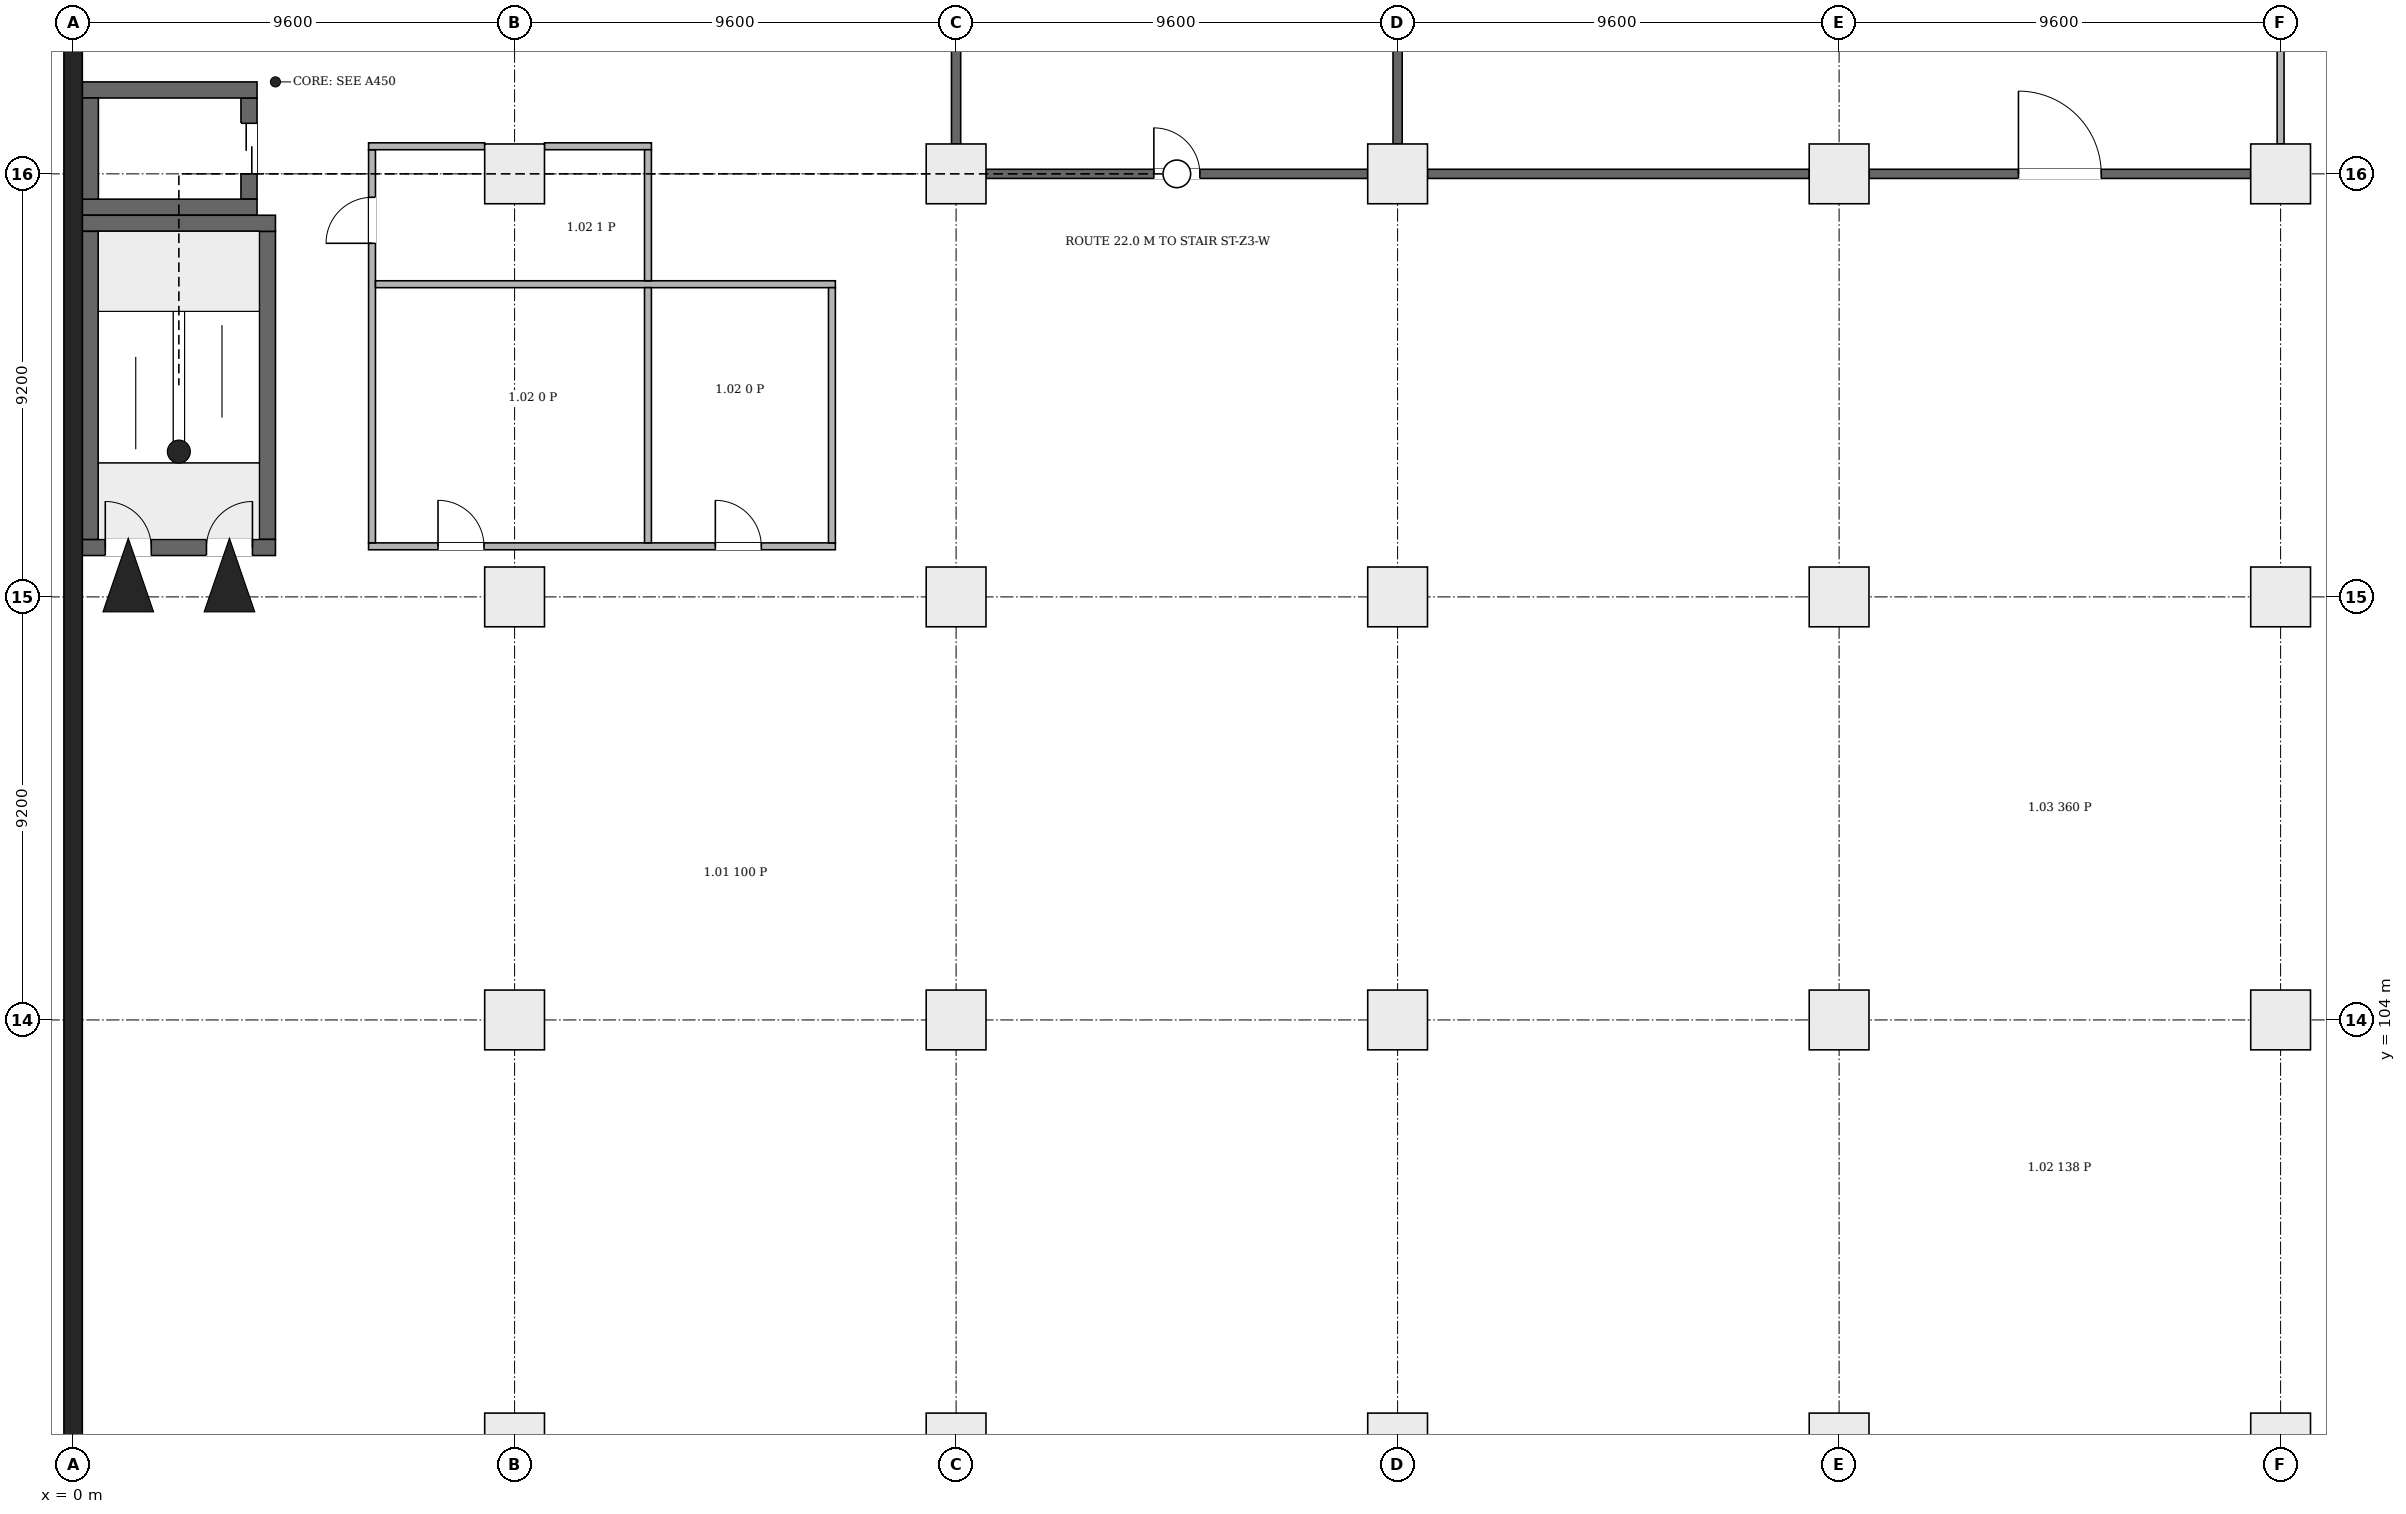
"""IFC4 building model, lengths in metres.
Left out: names, types, materials, properties, quantities, classifications, styles, units other than length and angle.
Written with IfcOpenShell. Run it as: python <this file> out.ifc"""

import sys

from ifc_helpers import new_model, si_unit, direction, frame, frame_2d, origin, origin_2d, place, context, subcontext, project, spatial, rectangle, extrude, element, fill, save


model = new_model("IFC4")
c1 = context("Model", 3, precision=1e-05, world=origin(), true_north=direction((0.0, 1.0)))
c2 = subcontext(c1, "Body", "Model", "MODEL_VIEW")
j1 = project(units=[si_unit("LENGTHUNIT", "METRE"), si_unit("PLANEANGLEUNIT", "RADIAN")], contexts=[c1])
p1 = place(None, origin())
s1 = spatial("IfcSite", under=j1, at=p1, CompositionType="ELEMENT")
p2 = place(p1, origin())
s2 = spatial("IfcBuilding", under=s1, at=p2, CompositionType="ELEMENT")
p3 = place(p2, frame((0.0, 0.0, 6.5)))
s3 = spatial("IfcBuildingStorey", under=s2, at=p3, CompositionType="ELEMENT", Elevation=6.5)
p4 = place(p3, frame((0.0, 94.12, 0.0), z_axis=(0.0, 0.0, 1.0), x_axis=(0.0, 1.0, 0.0)))
e1 = element("IfcWall", 1, at=p4, inside=s3, PredefinedType="SHEAR", context=c2, shape_type="SweptSolid", body=[
    extrude(rectangle(XDim=46.88, YDim=0.4, at=frame_2d((23.44, 0.0))), origin(), (0.0, 0.0, 1.0), 7.7),
])
p5 = place(p3, frame((0.2, 114.275, 0.0), z_axis=(0.0, 0.0, 1.0), x_axis=(1.0, 0.0, 0.0)))
e2 = element("IfcWall", 2, at=p5, inside=s3, PredefinedType="SHEAR", context=c2, shape_type="SweptSolid", body=[
    extrude(rectangle(XDim=4.2, YDim=0.35, at=frame_2d((2.1, 0.0))), origin(), (0.0, 0.0, 1.0), 7.7),
])
p6 = place(p5, frame((0.5, 0.0, 0.0)))
e3 = element("IfcOpeningElement", 3, at=p6, cuts=e2, PredefinedType="OPENING", context=c2, shape_type="SweptSolid", body=[
    extrude(rectangle(XDim=1.0, YDim=2.1, at=frame_2d((0.5, 1.05))), frame((0.0, 0.185, 0.0), z_axis=(0.0, -1.0, 0.0), x_axis=(1.0, 0.0, 0.0)), (0.0, 0.0, 1.0), 0.37),
])
p7 = place(p5, frame((2.7, 0.0, 0.0)))
e4 = element("IfcOpeningElement", 4, at=p7, cuts=e2, PredefinedType="OPENING", context=c2, shape_type="SweptSolid", body=[
    extrude(rectangle(XDim=1.0, YDim=2.1, at=frame_2d((0.5, 1.05))), frame((0.0, 0.185, 0.0), z_axis=(0.0, -1.0, 0.0), x_axis=(1.0, 0.0, 0.0)), (0.0, 0.0, 1.0), 0.37),
])
p8 = place(p3, frame((0.2, 121.325, 0.0), z_axis=(0.0, 0.0, 1.0), x_axis=(1.0, 0.0, 0.0)))
e5 = element("IfcWall", 5, at=p8, inside=s3, PredefinedType="SHEAR", context=c2, shape_type="SweptSolid", body=[
    extrude(rectangle(XDim=4.2, YDim=0.35, at=frame_2d((2.1, 0.0))), origin(), (0.0, 0.0, 1.0), 7.7),
])
for number, where, z_axis, x_axis in (
    (6, (0.375, 114.45, 0.0), (0.0, 0.0, 1.0), (0.0, 1.0, 0.0)),
    (7, (4.225, 114.45, 0.0), (0.0, 0.0, 1.0), (0.0, 1.0, 0.0)),
):
    element("IfcWall", number, at=place(p3, frame(where, z_axis=z_axis, x_axis=x_axis)), inside=s3, PredefinedType="SHEAR", context=c2, shape_type="SweptSolid", body=[
        extrude(rectangle(XDim=6.7, YDim=0.35, at=frame_2d((3.35, 0.0))), origin(), (0.0, 0.0, 1.0), 7.7),
    ])
for number, where, z_axis, x_axis in (
    (8, (0.2, 121.675, 0.0), (0.0, 0.0, 1.0), (1.0, 0.0, 0.0)),
    (9, (0.2, 124.225, 0.0), (0.0, 0.0, 1.0), (1.0, 0.0, 0.0)),
):
    element("IfcWall", number, at=place(p3, frame(where, z_axis=z_axis, x_axis=x_axis)), inside=s3, PredefinedType="SHEAR", context=c2, shape_type="SweptSolid", body=[
        extrude(rectangle(XDim=3.8, YDim=0.35, at=frame_2d((1.9, 0.0))), origin(), (0.0, 0.0, 1.0), 7.7),
    ])
p9 = place(p3, frame((0.375, 121.85, 0.0), z_axis=(0.0, 0.0, 1.0), x_axis=(0.0, 1.0, 0.0)))
e10 = element("IfcWall", 10, at=p9, inside=s3, PredefinedType="SHEAR", context=c2, shape_type="SweptSolid", body=[
    extrude(rectangle(XDim=2.2, YDim=0.35, at=frame_2d((1.1, 0.0))), origin(), (0.0, 0.0, 1.0), 7.7),
])
p10 = place(p3, frame((3.825, 121.85, 0.0), z_axis=(0.0, 0.0, 1.0), x_axis=(0.0, 1.0, 0.0)))
e11 = element("IfcWall", 11, at=p10, inside=s3, PredefinedType="SHEAR", context=c2, shape_type="SweptSolid", body=[
    extrude(rectangle(XDim=2.2, YDim=0.35, at=frame_2d((1.1, 0.0))), origin(), (0.0, 0.0, 1.0), 7.7),
])
p11 = place(p10, frame((0.55, 0.0, 0.0)))
e12 = element("IfcOpeningElement", 12, at=p11, cuts=e11, PredefinedType="OPENING", context=c2, shape_type="SweptSolid", body=[
    extrude(rectangle(XDim=1.1, YDim=2.1, at=frame_2d((0.55, 1.05))), frame((0.0, 0.185, 0.0), z_axis=(0.0, -1.0, 0.0), x_axis=(1.0, 0.0, 0.0)), (0.0, 0.0, 1.0), 0.37),
])
for number, where, z_axis, x_axis in (
    (13, (9.6, 94.8, 0.0), (0.0, 0.0, 1.0), (1.0, 0.0, 0.0)),
    (14, (19.2, 94.8, 0.0), (0.0, 0.0, 1.0), (1.0, 0.0, 0.0)),
    (15, (28.8, 94.8, 0.0), (0.0, 0.0, 1.0), (1.0, 0.0, 0.0)),
    (16, (38.4, 94.8, 0.0), (0.0, 0.0, 1.0), (1.0, 0.0, 0.0)),
    (17, (48.0, 94.8, 0.0), (0.0, 0.0, 1.0), (1.0, 0.0, 0.0)),
    (18, (9.6, 104.0, 0.0), (0.0, 0.0, 1.0), (1.0, 0.0, 0.0)),
    (19, (19.2, 104.0, 0.0), (0.0, 0.0, 1.0), (1.0, 0.0, 0.0)),
    (20, (28.8, 104.0, 0.0), (0.0, 0.0, 1.0), (1.0, 0.0, 0.0)),
    (21, (38.4, 104.0, 0.0), (0.0, 0.0, 1.0), (1.0, 0.0, 0.0)),
    (22, (48.0, 104.0, 0.0), (0.0, 0.0, 1.0), (1.0, 0.0, 0.0)),
    (23, (9.6, 113.2, 0.0), (0.0, 0.0, 1.0), (1.0, 0.0, 0.0)),
    (24, (19.2, 113.2, 0.0), (0.0, 0.0, 1.0), (1.0, 0.0, 0.0)),
    (25, (28.8, 113.2, 0.0), (0.0, 0.0, 1.0), (1.0, 0.0, 0.0)),
    (26, (38.4, 113.2, 0.0), (0.0, 0.0, 1.0), (1.0, 0.0, 0.0)),
    (27, (48.0, 113.2, 0.0), (0.0, 0.0, 1.0), (1.0, 0.0, 0.0)),
    (28, (9.6, 122.4, 0.0), (0.0, 0.0, 1.0), (1.0, 0.0, 0.0)),
    (29, (19.2, 122.4, 0.0), (0.0, 0.0, 1.0), (1.0, 0.0, 0.0)),
    (30, (28.8, 122.4, 0.0), (0.0, 0.0, 1.0), (1.0, 0.0, 0.0)),
    (31, (38.4, 122.4, 0.0), (0.0, 0.0, 1.0), (1.0, 0.0, 0.0)),
    (32, (48.0, 122.4, 0.0), (0.0, 0.0, 1.0), (1.0, 0.0, 0.0)),
):
    element("IfcColumn", number, at=place(p3, frame(where, z_axis=z_axis, x_axis=x_axis)), inside=s3, PredefinedType="COLUMN", context=c2, shape_type="SweptSolid", body=[
        extrude(rectangle(XDim=1.3, YDim=1.3, at=origin_2d()), origin(), (0.0, 0.0, 1.0), 7.7),
    ])
p12 = place(p3, frame((6.425, 114.3, 0.0), z_axis=(0.0, 0.0, 1.0), x_axis=(1.0, 0.0, 0.0)))
e33 = element("IfcWall", 33, at=p12, inside=s3, PredefinedType="PARTITIONING", context=c2, shape_type="SweptSolid", body=[
    extrude(rectangle(XDim=10.15, YDim=0.15, at=frame_2d((5.075, 0.0))), origin(), (0.0, 0.0, 1.0), 7.29),
])
p13 = place(p12, frame((1.51, 0.0, 0.0)))
e34 = element("IfcOpeningElement", 34, at=p13, cuts=e33, PredefinedType="OPENING", context=c2, shape_type="SweptSolid", body=[
    extrude(rectangle(XDim=1.0, YDim=2.1, at=frame_2d((0.5, 1.05))), frame((0.0, 0.085, 0.0), z_axis=(0.0, -1.0, 0.0), x_axis=(1.0, 0.0, 0.0)), (0.0, 0.0, 1.0), 0.17),
])
p14 = place(p12, frame((7.54, 0.0, 0.0)))
e35 = element("IfcOpeningElement", 35, at=p14, cuts=e33, PredefinedType="OPENING", context=c2, shape_type="SweptSolid", body=[
    extrude(rectangle(XDim=1.0, YDim=2.1, at=frame_2d((0.5, 1.05))), frame((0.0, 0.085, 0.0), z_axis=(0.0, -1.0, 0.0), x_axis=(1.0, 0.0, 0.0)), (0.0, 0.0, 1.0), 0.17),
])
p15 = place(p3, frame((6.5, 114.375, 0.0), z_axis=(0.0, 0.0, 1.0), x_axis=(0.0, 1.0, 0.0)))
e36 = element("IfcWall", 36, at=p15, inside=s3, PredefinedType="PARTITIONING", context=c2, shape_type="SweptSolid", body=[
    extrude(rectangle(XDim=8.55, YDim=0.15, at=frame_2d((4.275, 0.0))), origin(), (0.0, 0.0, 1.0), 7.29),
])
p16 = place(p15, frame((6.515, 0.0, 0.0)))
e37 = element("IfcOpeningElement", 37, at=p16, cuts=e36, PredefinedType="OPENING", context=c2, shape_type="SweptSolid", body=[
    extrude(rectangle(XDim=1.0, YDim=2.1, at=frame_2d((0.5, 1.05))), frame((0.0, 0.085, 0.0), z_axis=(0.0, -1.0, 0.0), x_axis=(1.0, 0.0, 0.0)), (0.0, 0.0, 1.0), 0.17),
])
p17 = place(p3, frame((6.425, 123.0, 0.0), z_axis=(0.0, 0.0, 1.0), x_axis=(1.0, 0.0, 0.0)))
e38 = element("IfcWall", 38, at=p17, inside=s3, PredefinedType="PARTITIONING", context=c2, shape_type="SweptSolid", body=[
    extrude(rectangle(XDim=2.525, YDim=0.15, at=frame_2d((1.262, 0.0))), origin(), (0.0, 0.0, 1.0), 7.29),
])
p18 = place(p3, frame((6.575, 120.0, 0.0), z_axis=(0.0, 0.0, 1.0), x_axis=(1.0, 0.0, 0.0)))
e39 = element("IfcWall", 39, at=p18, inside=s3, PredefinedType="PARTITIONING", context=c2, shape_type="SweptSolid", body=[
    extrude(rectangle(XDim=10.0, YDim=0.15, at=frame_2d((5.0, 0.0))), origin(), (0.0, 0.0, 1.0), 7.29),
])
p19 = place(p3, frame((10.25, 123.0, 0.0), z_axis=(0.0, 0.0, 1.0), x_axis=(1.0, 0.0, 0.0)))
e40 = element("IfcWall", 40, at=p19, inside=s3, PredefinedType="PARTITIONING", context=c2, shape_type="SweptSolid", body=[
    extrude(rectangle(XDim=2.325, YDim=0.15, at=frame_2d((1.163, 0.0))), origin(), (0.0, 0.0, 1.0), 7.29),
])
p20 = place(p3, frame((12.5, 114.375, 0.0), z_axis=(0.0, 0.0, 1.0), x_axis=(0.0, 1.0, 0.0)))
e41 = element("IfcWall", 41, at=p20, inside=s3, PredefinedType="PARTITIONING", context=c2, shape_type="SweptSolid", body=[
    extrude(rectangle(XDim=5.55, YDim=0.15, at=frame_2d((2.775, 0.0))), origin(), (0.0, 0.0, 1.0), 7.29),
])
p21 = place(p3, frame((12.5, 120.075, 0.0), z_axis=(0.0, 0.0, 1.0), x_axis=(0.0, 1.0, 0.0)))
e42 = element("IfcWall", 42, at=p21, inside=s3, PredefinedType="PARTITIONING", context=c2, shape_type="SweptSolid", body=[
    extrude(rectangle(XDim=2.85, YDim=0.15, at=frame_2d((1.425, 0.0))), origin(), (0.0, 0.0, 1.0), 7.29),
])
p22 = place(p3, frame((16.5, 114.375, 0.0), z_axis=(0.0, 0.0, 1.0), x_axis=(0.0, 1.0, 0.0)))
e43 = element("IfcWall", 43, at=p22, inside=s3, PredefinedType="PARTITIONING", context=c2, shape_type="SweptSolid", body=[
    extrude(rectangle(XDim=5.55, YDim=0.15, at=frame_2d((2.775, 0.0))), origin(), (0.0, 0.0, 1.0), 7.29),
])
p23 = place(p3, frame((19.2, 123.05, 0.0), z_axis=(0.0, 0.0, 1.0), x_axis=(0.0, 1.0, 0.0)))
e44 = element("IfcWall", 44, at=p23, inside=s3, PredefinedType="PARTITIONING", context=c2, shape_type="SweptSolid", body=[
    extrude(rectangle(XDim=7.9, YDim=0.2, at=frame_2d((3.95, 0.0))), origin(), (0.0, 0.0, 1.0), 6.89),
])
p24 = place(p3, frame((19.85, 122.4, 0.0), z_axis=(0.0, 0.0, 1.0), x_axis=(1.0, 0.0, 0.0)))
e45 = element("IfcWall", 45, at=p24, inside=s3, PredefinedType="PARTITIONING", context=c2, shape_type="SweptSolid", body=[
    extrude(rectangle(XDim=8.3, YDim=0.2, at=frame_2d((4.15, 0.0))), origin(), (0.0, 0.0, 1.0), 6.29),
])
p25 = place(p24, frame((3.65, 0.0, 0.0)))
e46 = element("IfcOpeningElement", 46, at=p25, cuts=e45, PredefinedType="OPENING", context=c2, shape_type="SweptSolid", body=[
    extrude(rectangle(XDim=1.0, YDim=2.1, at=frame_2d((0.5, 1.05))), frame((0.0, 0.11, 0.0), z_axis=(0.0, -1.0, 0.0), x_axis=(1.0, 0.0, 0.0)), (0.0, 0.0, 1.0), 0.22),
])
p26 = place(p3, frame((28.8, 123.05, 0.0), z_axis=(0.0, 0.0, 1.0), x_axis=(0.0, 1.0, 0.0)))
e47 = element("IfcWall", 47, at=p26, inside=s3, PredefinedType="PARTITIONING", context=c2, shape_type="SweptSolid", body=[
    extrude(rectangle(XDim=7.9, YDim=0.2, at=frame_2d((3.95, 0.0))), origin(), (0.0, 0.0, 1.0), 6.89),
])
p27 = place(p26, frame((3.35, 0.0, 0.0)))
e48 = element("IfcOpeningElement", 48, at=p27, cuts=e47, PredefinedType="OPENING", context=c2, shape_type="SweptSolid", body=[
    extrude(rectangle(XDim=1.2, YDim=2.1, at=frame_2d((0.6, 1.05))), frame((0.0, 0.11, 0.0), z_axis=(0.0, -1.0, 0.0), x_axis=(1.0, 0.0, 0.0)), (0.0, 0.0, 1.0), 0.22),
])
p28 = place(p3, frame((29.45, 122.4, 0.0), z_axis=(0.0, 0.0, 1.0), x_axis=(1.0, 0.0, 0.0)))
e49 = element("IfcWall", 49, at=p28, inside=s3, PredefinedType="PARTITIONING", context=c2, shape_type="SweptSolid", body=[
    extrude(rectangle(XDim=8.3, YDim=0.2, at=frame_2d((4.15, 0.0))), origin(), (0.0, 0.0, 1.0), 6.29),
])
p29 = place(p3, frame((39.05, 122.4, 0.0), z_axis=(0.0, 0.0, 1.0), x_axis=(1.0, 0.0, 0.0)))
e50 = element("IfcWall", 50, at=p29, inside=s3, PredefinedType="PARTITIONING", context=c2, shape_type="SweptSolid", body=[
    extrude(rectangle(XDim=8.3, YDim=0.2, at=frame_2d((4.15, 0.0))), origin(), (0.0, 0.0, 1.0), 6.29),
])
p30 = place(p29, frame((3.25, 0.0, 0.0)))
e51 = element("IfcOpeningElement", 51, at=p30, cuts=e50, PredefinedType="OPENING", context=c2, shape_type="SweptSolid", body=[
    extrude(rectangle(XDim=1.8, YDim=2.1, at=frame_2d((0.9, 1.05))), frame((0.0, 0.11, 0.0), z_axis=(0.0, -1.0, 0.0), x_axis=(1.0, 0.0, 0.0)), (0.0, 0.0, 1.0), 0.22),
])
p31 = place(p3, frame((48.0, 123.05, 0.0), z_axis=(0.0, 0.0, 1.0), x_axis=(0.0, 1.0, 0.0)))
e52 = element("IfcWall", 52, at=p31, inside=s3, PredefinedType="PARTITIONING", context=c2, shape_type="SweptSolid", body=[
    extrude(rectangle(XDim=7.9, YDim=0.15, at=frame_2d((3.95, 0.0))), origin(), (0.0, 0.0, 1.0), 6.89),
])
p32 = place(p6, origin())
e53 = element("IfcDoor", 53, at=p32, inside=s3, OperationType="SINGLE_SWING_RIGHT", PredefinedType="DOOR", context=c2, shape_type="SweptSolid", body=[
    extrude(rectangle(XDim=1.0, YDim=2.1, at=frame_2d((0.5, 1.05))), frame((0.0, 0.025, 0.0), z_axis=(0.0, -1.0, 0.0), x_axis=(1.0, 0.0, 0.0)), (0.0, 0.0, 1.0), 0.05),
])
fill(e3, e53)
p33 = place(p7, origin())
e54 = element("IfcDoor", 54, at=p33, inside=s3, OperationType="SINGLE_SWING_LEFT", PredefinedType="DOOR", context=c2, shape_type="SweptSolid", body=[
    extrude(rectangle(XDim=1.0, YDim=2.1, at=frame_2d((0.5, 1.05))), frame((0.0, 0.025, 0.0), z_axis=(0.0, -1.0, 0.0), x_axis=(1.0, 0.0, 0.0)), (0.0, 0.0, 1.0), 0.05),
])
fill(e4, e54)
p34 = place(p11, origin())
e55 = element("IfcDoor", 55, at=p34, inside=s3, OperationType="DOUBLE_DOOR_SLIDING", PredefinedType="DOOR", context=c2, shape_type="SweptSolid", body=[
    extrude(rectangle(XDim=1.1, YDim=2.1, at=frame_2d((0.55, 1.05))), frame((0.0, 0.025, 0.0), z_axis=(0.0, -1.0, 0.0), x_axis=(1.0, 0.0, 0.0)), (0.0, 0.0, 1.0), 0.05),
])
fill(e12, e55)
p35 = place(p13, origin())
e56 = element("IfcDoor", 56, at=p35, inside=s3, OperationType="SINGLE_SWING_LEFT", PredefinedType="DOOR", context=c2, shape_type="SweptSolid", body=[
    extrude(rectangle(XDim=1.0, YDim=2.1, at=frame_2d((0.5, 1.05))), frame((0.0, 0.025, 0.0), z_axis=(0.0, -1.0, 0.0), x_axis=(1.0, 0.0, 0.0)), (0.0, 0.0, 1.0), 0.05),
])
fill(e34, e56)
p36 = place(p14, origin())
e57 = element("IfcDoor", 57, at=p36, inside=s3, OperationType="SINGLE_SWING_RIGHT", PredefinedType="DOOR", context=c2, shape_type="SweptSolid", body=[
    extrude(rectangle(XDim=1.0, YDim=2.1, at=frame_2d((0.5, 1.05))), frame((0.0, 0.025, 0.0), z_axis=(0.0, -1.0, 0.0), x_axis=(1.0, 0.0, 0.0)), (0.0, 0.0, 1.0), 0.05),
])
fill(e35, e57)
p37 = place(p16, origin())
e58 = element("IfcDoor", 58, at=p37, inside=s3, OperationType="SINGLE_SWING_LEFT", PredefinedType="DOOR", context=c2, shape_type="SweptSolid", body=[
    extrude(rectangle(XDim=1.0, YDim=2.1, at=frame_2d((0.5, 1.05))), frame((0.0, 0.025, 0.0), z_axis=(0.0, -1.0, 0.0), x_axis=(1.0, 0.0, 0.0)), (0.0, 0.0, 1.0), 0.05),
])
fill(e37, e58)
p38 = place(p30, origin())
e59 = element("IfcDoor", 59, at=p38, inside=s3, OperationType="DOUBLE_DOOR_SINGLE_SWING", PredefinedType="DOOR", context=c2, shape_type="SweptSolid", body=[
    extrude(rectangle(XDim=1.8, YDim=2.1, at=frame_2d((0.9, 1.05))), frame((0.0, 0.025, 0.0), z_axis=(0.0, -1.0, 0.0), x_axis=(1.0, 0.0, 0.0)), (0.0, 0.0, 1.0), 0.05),
])
fill(e51, e59)
p39 = place(p25, origin())
e60 = element("IfcDoor", 60, at=p39, inside=s3, OperationType="SINGLE_SWING_LEFT", PredefinedType="DOOR", context=c2, shape_type="SweptSolid", body=[
    extrude(rectangle(XDim=1.0, YDim=2.1, at=frame_2d((0.5, 1.05))), frame((0.0, 0.025, 0.0), z_axis=(0.0, -1.0, 0.0), x_axis=(1.0, 0.0, 0.0)), (0.0, 0.0, 1.0), 0.05),
])
fill(e46, e60)
save(model, sys.argv[1])
